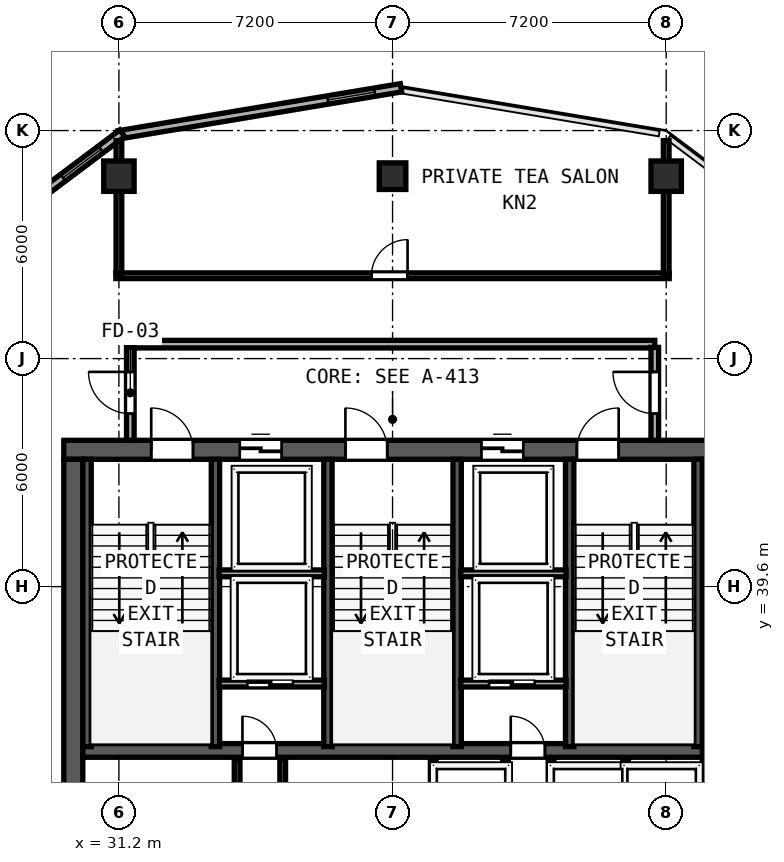
"""IFC4 building model, lengths in metres.
Left out: names, types, materials, properties, quantities, classifications, styles, units other than length and angle.
Written with IfcOpenShell. Run it as: python <this file> out.ifc"""

import sys

from ifc_helpers import new_model, si_unit, direction, frame, frame_2d, origin, origin_2d, place, context, subcontext, project, spatial, rectangle, hollow_rectangle, extrude, element, fill, save


model = new_model("IFC4")
c1 = context("Model", 3, precision=1e-05, world=origin(), true_north=direction((0.0, 1.0)))
c2 = subcontext(c1, "Body", "Model", "MODEL_VIEW")
j1 = project(units=[si_unit("LENGTHUNIT", "METRE"), si_unit("PLANEANGLEUNIT", "RADIAN")], contexts=[c1])
p1 = place(None, origin())
s1 = spatial("IfcSite", under=j1, at=p1, CompositionType="ELEMENT")
p2 = place(p1, origin())
s2 = spatial("IfcBuilding", under=s1, at=p2, CompositionType="ELEMENT")
p3 = place(p2, frame((0.0, 0.0, 262.15)))
s3 = spatial("IfcBuildingStorey", under=s2, at=p3, CompositionType="ELEMENT", Elevation=262.15)
p4 = place(p3, frame((29.75, 43.2, 0.0), z_axis=(0.0, 0.0, 1.0), x_axis=(1.0, 0.0, 0.0)))
e1 = element("IfcWall", 1, at=p4, inside=s3, PredefinedType="SHEAR", context=c2, shape_type="SweptSolid", body=[
    extrude(rectangle(XDim=17.3, YDim=0.5, at=frame_2d((8.65, 0.0))), origin(), (0.0, 0.0, 1.0), 3.67),
])
p5 = place(p4, frame((2.3, 0.0, 0.0)))
e2 = element("IfcOpeningElement", 2, at=p5, cuts=e1, PredefinedType="OPENING", context=c2, shape_type="SweptSolid", body=[
    extrude(rectangle(XDim=1.1, YDim=2.15, at=frame_2d((0.55, 1.075))), frame((0.0, 0.26, 0.0), z_axis=(0.0, -1.0, 0.0), x_axis=(1.0, 0.0, 0.0)), (0.0, 0.0, 1.0), 0.52),
])
p6 = place(p4, frame((7.41, 0.0, 0.0)))
e3 = element("IfcOpeningElement", 3, at=p6, cuts=e1, PredefinedType="OPENING", context=c2, shape_type="SweptSolid", body=[
    extrude(rectangle(XDim=1.1, YDim=2.15, at=frame_2d((0.55, 1.075))), frame((0.0, 0.26, 0.0), z_axis=(0.0, -1.0, 0.0), x_axis=(1.0, 0.0, 0.0)), (0.0, 0.0, 1.0), 0.52),
])
p7 = place(p4, frame((13.5, 0.0, 0.0)))
e4 = element("IfcOpeningElement", 4, at=p7, cuts=e1, PredefinedType="OPENING", context=c2, shape_type="SweptSolid", body=[
    extrude(rectangle(XDim=1.1, YDim=2.15, at=frame_2d((0.55, 1.075))), frame((0.0, 0.26, 0.0), z_axis=(0.0, -1.0, 0.0), x_axis=(1.0, 0.0, 0.0)), (0.0, 0.0, 1.0), 0.52),
])
p8 = place(p4, frame((4.63, 0.0, 0.0)))
e5 = element("IfcOpeningElement", 5, at=p8, cuts=e1, PredefinedType="OPENING", context=c2, shape_type="SweptSolid", body=[
    extrude(rectangle(XDim=1.1, YDim=2.2, at=frame_2d((0.55, 1.1))), frame((0.0, 0.26, 0.0), z_axis=(0.0, -1.0, 0.0), x_axis=(1.0, 0.0, 0.0)), (0.0, 0.0, 1.0), 0.52),
])
p9 = place(p4, frame((10.99, 0.0, 0.0)))
e6 = element("IfcOpeningElement", 6, at=p9, cuts=e1, PredefinedType="OPENING", context=c2, shape_type="SweptSolid", body=[
    extrude(rectangle(XDim=1.1, YDim=2.2, at=frame_2d((0.55, 1.1))), frame((0.0, 0.26, 0.0), z_axis=(0.0, -1.0, 0.0), x_axis=(1.0, 0.0, 0.0)), (0.0, 0.0, 1.0), 0.52),
])
for number, where, z_axis, x_axis in (
    (7, (30.0, 32.8, 0.0), (0.0, 0.0, 1.0), (0.0, 1.0, 0.0)),
    (8, (46.8, 32.8, 0.0), (0.0, 0.0, 1.0), (0.0, 1.0, 0.0)),
):
    element("IfcWall", number, at=place(p3, frame(where, z_axis=z_axis, x_axis=x_axis)), inside=s3, PredefinedType="SHEAR", context=c2, shape_type="SweptSolid", body=[
        extrude(rectangle(XDim=10.15, YDim=0.5, at=frame_2d((5.075, 0.0))), origin(), (0.0, 0.0, 1.0), 3.67),
    ])
p10 = place(p3, frame((30.25, 35.29, 0.0), z_axis=(0.0, 0.0, 1.0), x_axis=(1.0, 0.0, 0.0)))
e9 = element("IfcWall", 9, at=p10, inside=s3, PredefinedType="SHEAR", context=c2, shape_type="SweptSolid", body=[
    extrude(rectangle(XDim=16.3, YDim=0.36, at=frame_2d((8.15, 0.0))), origin(), (0.0, 0.0, 1.0), 3.67),
])
p11 = place(p10, frame((5.1, 0.0, 0.0), z_axis=(0.0, 0.0, 1.0), x_axis=(-1.0, 0.0, 0.0)))
e10 = element("IfcOpeningElement", 10, at=p11, cuts=e9, PredefinedType="OPENING", context=c2, shape_type="SweptSolid", body=[
    extrude(rectangle(XDim=0.9, YDim=2.1, at=frame_2d((0.45, 1.05))), frame((0.0, 0.19, 0.0), z_axis=(0.0, -1.0, 0.0), x_axis=(1.0, 0.0, 0.0)), (0.0, 0.0, 1.0), 0.38),
])
p12 = place(p10, frame((12.16, 0.0, 0.0), z_axis=(0.0, 0.0, 1.0), x_axis=(-1.0, 0.0, 0.0)))
e11 = element("IfcOpeningElement", 11, at=p12, cuts=e9, PredefinedType="OPENING", context=c2, shape_type="SweptSolid", body=[
    extrude(rectangle(XDim=0.9, YDim=2.1, at=frame_2d((0.45, 1.05))), frame((0.0, 0.19, 0.0), z_axis=(0.0, -1.0, 0.0), x_axis=(1.0, 0.0, 0.0)), (0.0, 0.0, 1.0), 0.38),
])
for number, where, z_axis, x_axis in (
    (12, (30.362, 35.39, 0.0), (0.0, 0.0, 1.0), (0.0, 1.0, 0.0)),
    (13, (33.74, 35.39, 0.0), (0.0, 0.0, 1.0), (0.0, 1.0, 0.0)),
    (14, (36.7, 35.39, 0.0), (0.0, 0.0, 1.0), (0.0, 1.0, 0.0)),
    (15, (40.1, 35.39, 0.0), (0.0, 0.0, 1.0), (0.0, 1.0, 0.0)),
    (16, (43.06, 35.39, 0.0), (0.0, 0.0, 1.0), (0.0, 1.0, 0.0)),
    (17, (46.438, 35.39, 0.0), (0.0, 0.0, 1.0), (0.0, 1.0, 0.0)),
):
    element("IfcWall", number, at=place(p3, frame(where, z_axis=z_axis, x_axis=x_axis)), inside=s3, PredefinedType="SHEAR", context=c2, shape_type="SweptSolid", body=[
        extrude(rectangle(XDim=7.56, YDim=0.22, at=frame_2d((3.78, 0.0))), origin(), (0.0, 0.0, 1.0), 3.67),
    ])
for number, where, z_axis, x_axis in (
    (18, (31.2, 50.4, 0.0), (0.0, 0.0, 1.0), (1.0, 0.0, 0.0)),
    (19, (45.6, 50.4, 0.0), (0.0, 0.0, 1.0), (1.0, 0.0, 0.0)),
):
    element("IfcColumn", number, at=place(p3, frame(where, z_axis=z_axis, x_axis=x_axis)), inside=s3, PredefinedType="COLUMN", context=c2, shape_type="SweptSolid", body=[
        extrude(hollow_rectangle(XDim=0.8, YDim=0.8, WallThickness=0.03, at=origin_2d()), origin(), (0.0, 0.0, 1.0), 3.85),
    ])
p13 = place(p3, frame((38.4, 50.4, 0.0), z_axis=(0.0, 0.0, 1.0), x_axis=(1.0, 0.0, 0.0)))
e20 = element("IfcColumn", 20, at=p13, inside=s3, PredefinedType="COLUMN", context=c2, shape_type="SweptSolid", body=[
    extrude(hollow_rectangle(XDim=0.7, YDim=0.7, WallThickness=0.026, at=origin_2d()), origin(), (0.0, 0.0, 1.0), 3.85),
])
p14 = place(p3, frame((38.622, 52.726, 0.0), z_axis=(0.0, 0.0, 1.0), x_axis=(-0.986390420428, -0.164420006349, 0.0)))
e21 = element("IfcWall", 21, at=p14, inside=s3, PredefinedType="SOLIDWALL", context=c2, shape_type="SweptSolid", body=[
    extrude(rectangle(XDim=7.534, YDim=0.22, at=frame_2d((3.767, 0.0))), origin(), (0.0, 0.0, 1.0), 3.67),
])
p15 = place(p14, frame((0.7, 0.0, 0.85)))
e22 = element("IfcOpeningElement", 22, at=p15, cuts=e21, PredefinedType="OPENING", context=c2, shape_type="SweptSolid", body=[
    extrude(rectangle(XDim=1.25, YDim=1.95, at=frame_2d((0.625, 0.975))), frame((0.0, 0.12, 0.0), z_axis=(0.0, -1.0, 0.0), x_axis=(1.0, 0.0, 0.0)), (0.0, 0.0, 1.0), 0.24),
])
p16 = place(p3, frame((31.289, 51.529, 0.0), z_axis=(0.0, 0.0, 1.0), x_axis=(-0.800014580093, -0.599980559383, 0.0)))
e23 = element("IfcWall", 23, at=p16, inside=s3, PredefinedType="SOLIDWALL", context=c2, shape_type="SweptSolid", body=[
    extrude(rectangle(XDim=6.028, YDim=0.22, at=frame_2d((3.014, 0.0))), origin(), (0.0, 0.0, 1.0), 3.67),
])
p17 = place(p16, frame((0.7, 0.0, 0.85)))
e24 = element("IfcOpeningElement", 24, at=p17, cuts=e23, PredefinedType="OPENING", context=c2, shape_type="SweptSolid", body=[
    extrude(rectangle(XDim=1.25, YDim=1.95, at=frame_2d((0.625, 0.975))), frame((0.0, 0.12, 0.0), z_axis=(0.0, -1.0, 0.0), x_axis=(1.0, 0.0, 0.0)), (0.0, 0.0, 1.0), 0.24),
])
p18 = place(p3, frame((31.5, 45.98, 0.0), z_axis=(0.0, 0.0, 1.0), x_axis=(1.0, 0.0, 0.0)))
e25 = element("IfcWall", 25, at=p18, inside=s3, PredefinedType="SOLIDWALL", context=c2, shape_type="SweptSolid", body=[
    extrude(rectangle(XDim=13.8, YDim=0.2, at=frame_2d((6.9, 0.0))), origin(), (0.0, 0.0, 1.0), 3.67),
])
p19 = place(p3, frame((31.5, 43.45, 0.0), z_axis=(0.0, 0.0, 1.0), x_axis=(0.0, 1.0, 0.0)))
e26 = element("IfcWall", 26, at=p19, inside=s3, PredefinedType="SOLIDWALL", context=c2, shape_type="SweptSolid", body=[
    extrude(rectangle(XDim=2.445, YDim=0.2, at=frame_2d((1.223, 0.0))), origin(), (0.0, 0.0, 1.0), 3.67),
])
p20 = place(p19, frame((1.8, 0.0, 0.0), z_axis=(0.0, 0.0, 1.0), x_axis=(-1.0, 0.0, 0.0)))
e27 = element("IfcOpeningElement", 27, at=p20, cuts=e26, PredefinedType="OPENING", context=c2, shape_type="SweptSolid", body=[
    extrude(rectangle(XDim=1.1, YDim=2.15, at=frame_2d((0.55, 1.075))), frame((0.0, 0.11, 0.0), z_axis=(0.0, -1.0, 0.0), x_axis=(1.0, 0.0, 0.0)), (0.0, 0.0, 1.0), 0.22),
])
p21 = place(p3, frame((45.3, 43.45, 0.0), z_axis=(0.0, 0.0, 1.0), x_axis=(0.0, 1.0, 0.0)))
e28 = element("IfcWall", 28, at=p21, inside=s3, PredefinedType="SOLIDWALL", context=c2, shape_type="SweptSolid", body=[
    extrude(rectangle(XDim=2.445, YDim=0.2, at=frame_2d((1.223, 0.0))), origin(), (0.0, 0.0, 1.0), 3.67),
])
p22 = place(p21, frame((0.7, 0.0, 0.0)))
e29 = element("IfcOpeningElement", 29, at=p22, cuts=e28, PredefinedType="OPENING", context=c2, shape_type="SweptSolid", body=[
    extrude(rectangle(XDim=1.1, YDim=2.15, at=frame_2d((0.55, 1.075))), frame((0.0, 0.11, 0.0), z_axis=(0.0, -1.0, 0.0), x_axis=(1.0, 0.0, 0.0)), (0.0, 0.0, 1.0), 0.22),
])
for number, where, z_axis, x_axis in (
    (30, (33.835, 39.95, 0.0), (0.0, 0.0, 1.0), (1.0, 0.0, 0.0)),
    (31, (40.195, 39.95, 0.0), (0.0, 0.0, 1.0), (1.0, 0.0, 0.0)),
):
    element("IfcWall", number, at=place(p3, frame(where, z_axis=z_axis, x_axis=x_axis)), inside=s3, PredefinedType="SOLIDWALL", context=c2, shape_type="SweptSolid", body=[
        extrude(rectangle(XDim=2.77, YDim=0.18, at=frame_2d((1.385, 0.0))), origin(), (0.0, 0.0, 1.0), 3.67),
    ])
p23 = place(p3, frame((33.835, 37.05, 0.0), z_axis=(0.0, 0.0, 1.0), x_axis=(1.0, 0.0, 0.0)))
e32 = element("IfcWall", 32, at=p23, inside=s3, PredefinedType="SOLIDWALL", context=c2, shape_type="SweptSolid", body=[
    extrude(rectangle(XDim=2.77, YDim=0.18, at=frame_2d((1.385, 0.0))), origin(), (0.0, 0.0, 1.0), 3.67),
])
p24 = place(p23, frame((1.945, 0.0, 0.0), z_axis=(0.0, 0.0, 1.0), x_axis=(-1.0, 0.0, 0.0)))
e33 = element("IfcOpeningElement", 33, at=p24, cuts=e32, PredefinedType="OPENING", context=c2, shape_type="SweptSolid", body=[
    extrude(rectangle(XDim=1.2, YDim=2.2, at=frame_2d((0.6, 1.1))), frame((0.0, 0.1, 0.0), z_axis=(0.0, -1.0, 0.0), x_axis=(1.0, 0.0, 0.0)), (0.0, 0.0, 1.0), 0.2),
])
for number, where, z_axis, x_axis in (
    (34, (34.31, 32.88, 0.0), (0.0, 0.0, 1.0), (0.0, 1.0, 0.0)),
    (35, (35.51, 32.88, 0.0), (0.0, 0.0, 1.0), (0.0, 1.0, 0.0)),
):
    element("IfcWall", number, at=place(p3, frame(where, z_axis=z_axis, x_axis=x_axis)), inside=s3, PredefinedType="SOLIDWALL", context=c2, shape_type="SweptSolid", body=[
        extrude(rectangle(XDim=2.17, YDim=0.15, at=frame_2d((1.085, 0.0))), origin(), (0.0, 0.0, 1.0), 3.67),
    ])
p25 = place(p3, frame((40.195, 37.05, 0.0), z_axis=(0.0, 0.0, 1.0), x_axis=(1.0, 0.0, 0.0)))
e36 = element("IfcWall", 36, at=p25, inside=s3, PredefinedType="SOLIDWALL", context=c2, shape_type="SweptSolid", body=[
    extrude(rectangle(XDim=2.77, YDim=0.18, at=frame_2d((1.385, 0.0))), origin(), (0.0, 0.0, 1.0), 3.67),
])
p26 = place(p25, frame((1.945, 0.0, 0.0), z_axis=(0.0, 0.0, 1.0), x_axis=(-1.0, 0.0, 0.0)))
e37 = element("IfcOpeningElement", 37, at=p26, cuts=e36, PredefinedType="OPENING", context=c2, shape_type="SweptSolid", body=[
    extrude(rectangle(XDim=1.2, YDim=2.2, at=frame_2d((0.6, 1.1))), frame((0.0, 0.1, 0.0), z_axis=(0.0, -1.0, 0.0), x_axis=(1.0, 0.0, 0.0)), (0.0, 0.0, 1.0), 0.2),
])
for number, where, z_axis, x_axis in (
    (38, (41.37, 32.88, 0.0), (0.0, 0.0, 1.0), (0.0, 1.0, 0.0)),
    (39, (42.57, 32.88, 0.0), (0.0, 0.0, 1.0), (0.0, 1.0, 0.0)),
):
    element("IfcWall", number, at=place(p3, frame(where, z_axis=z_axis, x_axis=x_axis)), inside=s3, PredefinedType="SOLIDWALL", context=c2, shape_type="SweptSolid", body=[
        extrude(rectangle(XDim=2.17, YDim=0.15, at=frame_2d((1.085, 0.0))), origin(), (0.0, 0.0, 1.0), 3.67),
    ])
for number, where, z_axis, x_axis in (
    (40, (39.47, 32.95, 0.0), (0.0, 0.0, 1.0), (0.0, 1.0, 0.0)),
    (41, (44.53, 32.95, 0.0), (0.0, 0.0, 1.0), (0.0, 1.0, 0.0)),
):
    element("IfcWall", number, at=place(p3, frame(where, z_axis=z_axis, x_axis=x_axis)), inside=s3, PredefinedType="SOLIDWALL", context=c2, shape_type="SweptSolid", body=[
        extrude(rectangle(XDim=2.05, YDim=0.15, at=frame_2d((1.025, 0.0))), origin(), (0.0, 0.0, 1.0), 3.67),
    ])
p27 = place(p3, frame((31.12, 47.78, 0.0), z_axis=(0.0, 0.0, 1.0), x_axis=(1.0, 0.0, 0.0)))
e42 = element("IfcWall", 42, at=p27, inside=s3, PredefinedType="PARTITIONING", context=c2, shape_type="SweptSolid", body=[
    extrude(rectangle(XDim=14.56, YDim=0.15, at=frame_2d((7.28, 0.0))), origin(), (0.0, 0.0, 1.0), 3.67),
])
p28 = place(p27, frame((6.725, 0.0, 0.0)))
e43 = element("IfcOpeningElement", 43, at=p28, cuts=e42, PredefinedType="OPENING", context=c2, shape_type="SweptSolid", body=[
    extrude(rectangle(XDim=0.95, YDim=2.12, at=frame_2d((0.475, 1.06))), frame((0.0, 0.085, 0.0), z_axis=(0.0, -1.0, 0.0), x_axis=(1.0, 0.0, 0.0)), (0.0, 0.0, 1.0), 0.17),
])
for number, where, z_axis, x_axis in (
    (44, (31.2, 47.84, 0.0), (0.0, 0.0, 1.0), (0.0, 1.0, 0.0)),
    (45, (45.6, 47.84, 0.0), (0.0, 0.0, 1.0), (0.0, 1.0, 0.0)),
):
    element("IfcWall", number, at=place(p3, frame(where, z_axis=z_axis, x_axis=x_axis)), inside=s3, PredefinedType="PARTITIONING", context=c2, shape_type="SweptSolid", body=[
        extrude(rectangle(XDim=3.495, YDim=0.15, at=frame_2d((1.748, 0.0))), origin(), (0.0, 0.0, 1.0), 3.205),
    ])
p29 = place(p15, origin())
e46 = element("IfcWindow", 46, at=p29, inside=s3, PartitioningType="SINGLE_PANEL", PredefinedType="WINDOW", context=c2, shape_type="SweptSolid", body=[
    extrude(rectangle(XDim=1.25, YDim=1.95, at=frame_2d((0.625, 0.975))), frame((0.0, 0.03, 0.0), z_axis=(0.0, -1.0, 0.0), x_axis=(1.0, 0.0, 0.0)), (0.0, 0.0, 1.0), 0.06),
])
fill(e22, e46)
p30 = place(p17, origin())
e47 = element("IfcWindow", 47, at=p30, inside=s3, PartitioningType="SINGLE_PANEL", PredefinedType="WINDOW", context=c2, shape_type="SweptSolid", body=[
    extrude(rectangle(XDim=1.25, YDim=1.95, at=frame_2d((0.625, 0.975))), frame((0.0, 0.03, 0.0), z_axis=(0.0, -1.0, 0.0), x_axis=(1.0, 0.0, 0.0)), (0.0, 0.0, 1.0), 0.06),
])
fill(e24, e47)
p31 = place(p5, origin())
e48 = element("IfcDoor", 48, at=p31, inside=s3, OperationType="SINGLE_SWING_LEFT", PredefinedType="DOOR", context=c2, shape_type="SweptSolid", body=[
    extrude(rectangle(XDim=1.1, YDim=2.15, at=frame_2d((0.55, 1.075))), frame((0.0, 0.185, 0.0), z_axis=(0.0, -1.0, 0.0), x_axis=(1.0, 0.0, 0.0)), (0.0, 0.0, 1.0), 0.05),
])
fill(e2, e48)
p32 = place(p6, origin())
e49 = element("IfcDoor", 49, at=p32, inside=s3, OperationType="SINGLE_SWING_LEFT", PredefinedType="DOOR", context=c2, shape_type="SweptSolid", body=[
    extrude(rectangle(XDim=1.1, YDim=2.15, at=frame_2d((0.55, 1.075))), frame((0.0, 0.185, 0.0), z_axis=(0.0, -1.0, 0.0), x_axis=(1.0, 0.0, 0.0)), (0.0, 0.0, 1.0), 0.05),
])
fill(e3, e49)
p33 = place(p7, origin())
e50 = element("IfcDoor", 50, at=p33, inside=s3, OperationType="SINGLE_SWING_RIGHT", PredefinedType="DOOR", context=c2, shape_type="SweptSolid", body=[
    extrude(rectangle(XDim=1.1, YDim=2.15, at=frame_2d((0.55, 1.075))), frame((0.0, 0.185, 0.0), z_axis=(0.0, -1.0, 0.0), x_axis=(1.0, 0.0, 0.0)), (0.0, 0.0, 1.0), 0.05),
])
fill(e4, e50)
p34 = place(p20, origin())
e51 = element("IfcDoor", 51, at=p34, inside=s3, OperationType="SINGLE_SWING_LEFT", PredefinedType="DOOR", context=c2, shape_type="SweptSolid", body=[
    extrude(rectangle(XDim=1.1, YDim=2.15, at=frame_2d((0.55, 1.075))), frame((0.0, 0.025, 0.0), z_axis=(0.0, -1.0, 0.0), x_axis=(1.0, 0.0, 0.0)), (0.0, 0.0, 1.0), 0.05),
])
fill(e27, e51)
p35 = place(p22, origin())
e52 = element("IfcDoor", 52, at=p35, inside=s3, OperationType="SINGLE_SWING_RIGHT", PredefinedType="DOOR", context=c2, shape_type="SweptSolid", body=[
    extrude(rectangle(XDim=1.1, YDim=2.15, at=frame_2d((0.55, 1.075))), frame((0.0, 0.025, 0.0), z_axis=(0.0, -1.0, 0.0), x_axis=(1.0, 0.0, 0.0)), (0.0, 0.0, 1.0), 0.05),
])
fill(e29, e52)
p36 = place(p8, origin())
e53 = element("IfcDoor", 53, at=p36, inside=s3, OperationType="SLIDING_TO_LEFT", PredefinedType="DOOR", context=c2, shape_type="SweptSolid", body=[
    extrude(rectangle(XDim=1.1, YDim=2.2, at=frame_2d((0.55, 1.1))), frame((0.0, 0.185, 0.0), z_axis=(0.0, -1.0, 0.0), x_axis=(1.0, 0.0, 0.0)), (0.0, 0.0, 1.0), 0.05),
])
fill(e5, e53)
p37 = place(p9, origin())
e54 = element("IfcDoor", 54, at=p37, inside=s3, OperationType="SLIDING_TO_LEFT", PredefinedType="DOOR", context=c2, shape_type="SweptSolid", body=[
    extrude(rectangle(XDim=1.1, YDim=2.2, at=frame_2d((0.55, 1.1))), frame((0.0, 0.185, 0.0), z_axis=(0.0, -1.0, 0.0), x_axis=(1.0, 0.0, 0.0)), (0.0, 0.0, 1.0), 0.05),
])
fill(e6, e54)
p38 = place(p24, origin())
e55 = element("IfcDoor", 55, at=p38, inside=s3, OperationType="SLIDING_TO_RIGHT", PredefinedType="DOOR", context=c2, shape_type="SweptSolid", body=[
    extrude(rectangle(XDim=1.2, YDim=2.2, at=frame_2d((0.6, 1.1))), frame((0.0, 0.025, 0.0), z_axis=(0.0, -1.0, 0.0), x_axis=(1.0, 0.0, 0.0)), (0.0, 0.0, 1.0), 0.05),
])
fill(e33, e55)
p39 = place(p11, origin())
e56 = element("IfcDoor", 56, at=p39, inside=s3, OperationType="SINGLE_SWING_RIGHT", PredefinedType="DOOR", context=c2, shape_type="SweptSolid", body=[
    extrude(rectangle(XDim=0.9, YDim=2.1, at=frame_2d((0.45, 1.05))), frame((0.0, 0.025, 0.0), z_axis=(0.0, -1.0, 0.0), x_axis=(1.0, 0.0, 0.0)), (0.0, 0.0, 1.0), 0.05),
])
fill(e10, e56)
p40 = place(p26, origin())
e57 = element("IfcDoor", 57, at=p40, inside=s3, OperationType="SLIDING_TO_RIGHT", PredefinedType="DOOR", context=c2, shape_type="SweptSolid", body=[
    extrude(rectangle(XDim=1.2, YDim=2.2, at=frame_2d((0.6, 1.1))), frame((0.0, 0.025, 0.0), z_axis=(0.0, -1.0, 0.0), x_axis=(1.0, 0.0, 0.0)), (0.0, 0.0, 1.0), 0.05),
])
fill(e37, e57)
p41 = place(p12, origin())
e58 = element("IfcDoor", 58, at=p41, inside=s3, OperationType="SINGLE_SWING_RIGHT", PredefinedType="DOOR", context=c2, shape_type="SweptSolid", body=[
    extrude(rectangle(XDim=0.9, YDim=2.1, at=frame_2d((0.45, 1.05))), frame((0.0, 0.025, 0.0), z_axis=(0.0, -1.0, 0.0), x_axis=(1.0, 0.0, 0.0)), (0.0, 0.0, 1.0), 0.05),
])
fill(e11, e58)
p42 = place(p28, origin())
e59 = element("IfcDoor", 59, at=p42, inside=s3, OperationType="SINGLE_SWING_RIGHT", PredefinedType="DOOR", context=c2, shape_type="SweptSolid", body=[
    extrude(rectangle(XDim=0.95, YDim=2.12, at=frame_2d((0.475, 1.06))), frame((0.0, 0.025, 0.0), z_axis=(0.0, -1.0, 0.0), x_axis=(1.0, 0.0, 0.0)), (0.0, 0.0, 1.0), 0.05),
])
fill(e43, e59)
save(model, sys.argv[1])
